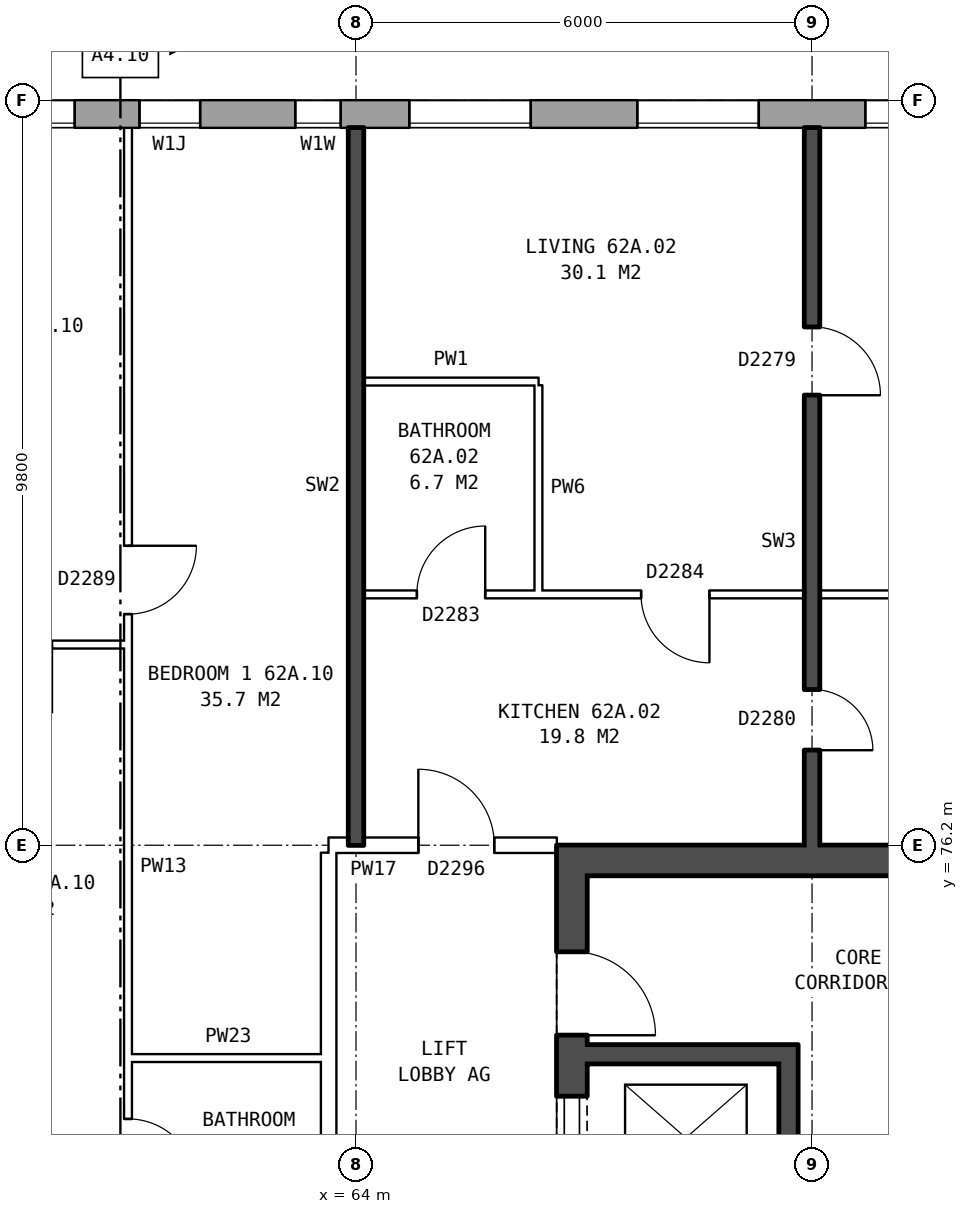
"""IFC4 building model, lengths in metres.
Left out: names, types, materials, properties, quantities, classifications, styles, units other than length and angle.
Written with IfcOpenShell. Run it as: python <this file> out.ifc"""

import sys

from ifc_helpers import new_model, si_unit, direction, frame, frame_2d, origin, place, context, subcontext, project, spatial, rectangle, extrude, element, fill, save


model = new_model("IFC4")
c1 = context("Model", 3, precision=1e-05, world=origin(), true_north=direction((0.0, 1.0)))
c2 = subcontext(c1, "Body", "Model", "MODEL_VIEW")
j1 = project(units=[si_unit("LENGTHUNIT", "METRE"), si_unit("PLANEANGLEUNIT", "RADIAN")], contexts=[c1])
p1 = place(None, origin())
s1 = spatial("IfcSite", under=j1, at=p1, CompositionType="ELEMENT")
p2 = place(p1, origin())
s2 = spatial("IfcBuilding", under=s1, at=p2, CompositionType="ELEMENT")
p3 = place(p2, frame((0.0, 0.0, 221.4)))
s3 = spatial("IfcBuildingStorey", under=s2, at=p3, CompositionType="ELEMENT", Elevation=221.4)
p4 = place(p3, frame((74.95, 85.82, 0.0), z_axis=(0.0, 0.0, 1.0), x_axis=(-1.0, 0.0, 0.0)))
e1 = element("IfcWall", 1, at=p4, inside=s3, PredefinedType="STANDARD", context=c2, shape_type="SweptSolid", body=[
    extrude(rectangle(XDim=39.875, YDim=0.36, at=frame_2d((19.938, 0.0))), origin(), (0.0, 0.0, 1.0), 2.85),
])
p5 = place(p4, frame((2.65, 0.0, 0.8)))
e2 = element("IfcOpeningElement", 2, at=p5, cuts=e1, PredefinedType="OPENING", context=c2, shape_type="SweptSolid", body=[
    extrude(rectangle(XDim=1.6, YDim=1.8, at=frame_2d((0.8, 0.9))), frame((0.0, 0.19, 0.0), z_axis=(0.0, -1.0, 0.0), x_axis=(1.0, 0.0, 0.0)), (0.0, 0.0, 1.0), 0.38),
])
p6 = place(p4, frame((5.65, 0.0, 0.8)))
e3 = element("IfcOpeningElement", 3, at=p6, cuts=e1, PredefinedType="OPENING", context=c2, shape_type="SweptSolid", body=[
    extrude(rectangle(XDim=1.6, YDim=1.8, at=frame_2d((0.8, 0.9))), frame((0.0, 0.19, 0.0), z_axis=(0.0, -1.0, 0.0), x_axis=(1.0, 0.0, 0.0)), (0.0, 0.0, 1.0), 0.38),
])
p7 = place(p4, frame((8.65, 0.0, 0.8)))
e4 = element("IfcOpeningElement", 4, at=p7, cuts=e1, PredefinedType="OPENING", context=c2, shape_type="SweptSolid", body=[
    extrude(rectangle(XDim=1.6, YDim=1.8, at=frame_2d((0.8, 0.9))), frame((0.0, 0.19, 0.0), z_axis=(0.0, -1.0, 0.0), x_axis=(1.0, 0.0, 0.0)), (0.0, 0.0, 1.0), 0.38),
])
p8 = place(p4, frame((11.15, 0.0, 1.55)))
e5 = element("IfcOpeningElement", 5, at=p8, cuts=e1, PredefinedType="OPENING", context=c2, shape_type="SweptSolid", body=[
    extrude(rectangle(XDim=0.6, YDim=0.9, at=frame_2d((0.3, 0.45))), frame((0.0, 0.19, 0.0), z_axis=(0.0, -1.0, 0.0), x_axis=(1.0, 0.0, 0.0)), (0.0, 0.0, 1.0), 0.38),
])
p9 = place(p4, frame((14.65, 0.0, 0.8)))
e6 = element("IfcOpeningElement", 6, at=p9, cuts=e1, PredefinedType="OPENING", context=c2, shape_type="SweptSolid", body=[
    extrude(rectangle(XDim=1.6, YDim=1.8, at=frame_2d((0.8, 0.9))), frame((0.0, 0.19, 0.0), z_axis=(0.0, -1.0, 0.0), x_axis=(1.0, 0.0, 0.0)), (0.0, 0.0, 1.0), 0.38),
])
p10 = place(p4, frame((17.65, 0.0, 0.8)))
e7 = element("IfcOpeningElement", 7, at=p10, cuts=e1, PredefinedType="OPENING", context=c2, shape_type="SweptSolid", body=[
    extrude(rectangle(XDim=1.6, YDim=1.8, at=frame_2d((0.8, 0.9))), frame((0.0, 0.19, 0.0), z_axis=(0.0, -1.0, 0.0), x_axis=(1.0, 0.0, 0.0)), (0.0, 0.0, 1.0), 0.38),
])
p11 = place(p4, frame((20.65, 0.0, 0.8)))
e8 = element("IfcOpeningElement", 8, at=p11, cuts=e1, PredefinedType="OPENING", context=c2, shape_type="SweptSolid", body=[
    extrude(rectangle(XDim=1.6, YDim=1.8, at=frame_2d((0.8, 0.9))), frame((0.0, 0.19, 0.0), z_axis=(0.0, -1.0, 0.0), x_axis=(1.0, 0.0, 0.0)), (0.0, 0.0, 1.0), 0.38),
])
p12 = place(p4, frame((23.65, 0.0, 0.8)))
e9 = element("IfcOpeningElement", 9, at=p12, cuts=e1, PredefinedType="OPENING", context=c2, shape_type="SweptSolid", body=[
    extrude(rectangle(XDim=1.6, YDim=1.8, at=frame_2d((0.8, 0.9))), frame((0.0, 0.19, 0.0), z_axis=(0.0, -1.0, 0.0), x_axis=(1.0, 0.0, 0.0)), (0.0, 0.0, 1.0), 0.38),
])
p13 = place(p4, frame((26.65, 0.0, 0.8)))
e10 = element("IfcOpeningElement", 10, at=p13, cuts=e1, PredefinedType="OPENING", context=c2, shape_type="SweptSolid", body=[
    extrude(rectangle(XDim=1.6, YDim=1.8, at=frame_2d((0.8, 0.9))), frame((0.0, 0.19, 0.0), z_axis=(0.0, -1.0, 0.0), x_axis=(1.0, 0.0, 0.0)), (0.0, 0.0, 1.0), 0.38),
])
p14 = place(p4, frame((30.05, 0.0, 1.7)))
e11 = element("IfcOpeningElement", 11, at=p14, cuts=e1, PredefinedType="OPENING", context=c2, shape_type="SweptSolid", body=[
    extrude(rectangle(XDim=0.6, YDim=0.9, at=frame_2d((0.3, 0.45))), frame((0.0, 0.19, 0.0), z_axis=(0.0, -1.0, 0.0), x_axis=(1.0, 0.0, 0.0)), (0.0, 0.0, 1.0), 0.38),
])
p15 = place(p4, frame((32.65, 0.0, 0.8)))
e12 = element("IfcOpeningElement", 12, at=p15, cuts=e1, PredefinedType="OPENING", context=c2, shape_type="SweptSolid", body=[
    extrude(rectangle(XDim=1.6, YDim=1.8, at=frame_2d((0.8, 0.9))), frame((0.0, 0.19, 0.0), z_axis=(0.0, -1.0, 0.0), x_axis=(1.0, 0.0, 0.0)), (0.0, 0.0, 1.0), 0.38),
])
p16 = place(p4, frame((35.65, 0.0, 0.8)))
e13 = element("IfcOpeningElement", 13, at=p16, cuts=e1, PredefinedType="OPENING", context=c2, shape_type="SweptSolid", body=[
    extrude(rectangle(XDim=1.6, YDim=1.8, at=frame_2d((0.8, 0.9))), frame((0.0, 0.19, 0.0), z_axis=(0.0, -1.0, 0.0), x_axis=(1.0, 0.0, 0.0)), (0.0, 0.0, 1.0), 0.38),
])
p17 = place(p4, frame((13.0, 0.0, 0.15)))
e14 = element("IfcOpeningElement", 14, at=p17, cuts=e1, PredefinedType="OPENING", context=c2, shape_type="SweptSolid", body=[
    extrude(rectangle(XDim=0.8, YDim=1.5, at=frame_2d((0.4, 0.75))), frame((0.0, 0.19, 0.0), z_axis=(0.0, -1.0, 0.0), x_axis=(1.0, 0.0, 0.0)), (0.0, 0.0, 1.0), 0.38),
])
p18 = place(p4, frame((30.95, 0.0, 0.8)))
e15 = element("IfcOpeningElement", 15, at=p18, cuts=e1, PredefinedType="OPENING", context=c2, shape_type="SweptSolid", body=[
    extrude(rectangle(XDim=1.4, YDim=1.8, at=frame_2d((0.7, 0.9))), frame((0.0, 0.19, 0.0), z_axis=(0.0, -1.0, 0.0), x_axis=(1.0, 0.0, 0.0)), (0.0, 0.0, 1.0), 0.38),
])
p19 = place(p3, frame((66.84, 63.8, 0.0), z_axis=(0.0, 0.0, 1.0), x_axis=(0.0, 1.0, 0.0)))
e16 = element("IfcWall", 16, at=p19, inside=s3, PredefinedType="SHEAR", context=c2, shape_type="SweptSolid", body=[
    extrude(rectangle(XDim=12.4, YDim=0.4, at=frame_2d((6.2, 0.0))), origin(), (0.0, 0.0, 1.0), 2.85),
])
p20 = place(p19, frame((1.325, 0.0, 0.0)))
e17 = element("IfcOpeningElement", 17, at=p20, cuts=e16, PredefinedType="OPENING", context=c2, shape_type="SweptSolid", body=[
    extrude(rectangle(XDim=1.1, YDim=2.1, at=frame_2d((0.55, 1.05))), frame((0.0, 0.21, 0.0), z_axis=(0.0, -1.0, 0.0), x_axis=(1.0, 0.0, 0.0)), (0.0, 0.0, 1.0), 0.42),
])
p21 = place(p19, frame((3.6, 0.0, 0.0)))
e18 = element("IfcOpeningElement", 18, at=p21, cuts=e16, PredefinedType="OPENING", context=c2, shape_type="SweptSolid", body=[
    extrude(rectangle(XDim=1.1, YDim=2.1, at=frame_2d((0.55, 1.05))), frame((0.0, 0.21, 0.0), z_axis=(0.0, -1.0, 0.0), x_axis=(1.0, 0.0, 0.0)), (0.0, 0.0, 1.0), 0.42),
])
p22 = place(p19, frame((5.8, 0.0, 0.0)))
e19 = element("IfcOpeningElement", 19, at=p22, cuts=e16, PredefinedType="OPENING", context=c2, shape_type="SweptSolid", body=[
    extrude(rectangle(XDim=1.1, YDim=2.1, at=frame_2d((0.55, 1.05))), frame((0.0, 0.21, 0.0), z_axis=(0.0, -1.0, 0.0), x_axis=(1.0, 0.0, 0.0)), (0.0, 0.0, 1.0), 0.42),
])
p23 = place(p19, frame((8.0, 0.0, 0.0)))
e20 = element("IfcOpeningElement", 20, at=p23, cuts=e16, PredefinedType="OPENING", context=c2, shape_type="SweptSolid", body=[
    extrude(rectangle(XDim=1.1, YDim=2.1, at=frame_2d((0.55, 1.05))), frame((0.0, 0.21, 0.0), z_axis=(0.0, -1.0, 0.0), x_axis=(1.0, 0.0, 0.0)), (0.0, 0.0, 1.0), 0.42),
])
p24 = place(p19, frame((9.9, 0.0, 0.0)))
e21 = element("IfcOpeningElement", 21, at=p24, cuts=e16, PredefinedType="OPENING", context=c2, shape_type="SweptSolid", body=[
    extrude(rectangle(XDim=1.1, YDim=2.1, at=frame_2d((0.55, 1.05))), frame((0.0, 0.21, 0.0), z_axis=(0.0, -1.0, 0.0), x_axis=(1.0, 0.0, 0.0)), (0.0, 0.0, 1.0), 0.42),
])
p25 = place(p3, frame((67.04, 76.0, 0.0), z_axis=(0.0, 0.0, 1.0), x_axis=(1.0, 0.0, 0.0)))
e22 = element("IfcWall", 22, at=p25, inside=s3, PredefinedType="SHEAR", context=c2, shape_type="SweptSolid", body=[
    extrude(rectangle(XDim=8.2, YDim=0.4, at=frame_2d((4.1, 0.0))), origin(), (0.0, 0.0, 1.0), 2.85),
])
p26 = place(p3, frame((67.04, 73.45, 0.0), z_axis=(0.0, 0.0, 1.0), x_axis=(1.0, 0.0, 0.0)))
e23 = element("IfcWall", 23, at=p26, inside=s3, PredefinedType="SHEAR", context=c2, shape_type="SweptSolid", body=[
    extrude(rectangle(XDim=2.525, YDim=0.25, at=frame_2d((1.262, 0.0))), origin(), (0.0, 0.0, 1.0), 2.85),
])
p27 = place(p3, frame((69.69, 66.975, 0.0), z_axis=(0.0, 0.0, 1.0), x_axis=(0.0, 1.0, 0.0)))
e24 = element("IfcWall", 24, at=p27, inside=s3, PredefinedType="SHEAR", context=c2, shape_type="SweptSolid", body=[
    extrude(rectangle(XDim=6.6, YDim=0.25, at=frame_2d((3.3, 0.0))), origin(), (0.0, 0.0, 1.0), 2.85),
])
p28 = place(p3, frame((63.64, 63.9, 0.0), z_axis=(0.0, 0.0, 1.0), x_axis=(0.0, 1.0, 0.0)))
e25 = element("IfcWall", 25, at=p28, inside=s3, PredefinedType="PARTITIONING", context=c2, shape_type="SweptSolid", body=[
    extrude(rectangle(XDim=12.2, YDim=0.2, at=frame_2d((6.1, 0.0))), origin(), (0.0, 0.0, 1.0), 2.85),
])
p29 = place(p28, frame((5.1, 0.0, 0.0)))
e26 = element("IfcOpeningElement", 26, at=p29, cuts=e25, PredefinedType="OPENING", context=c2, shape_type="SweptSolid", body=[
    extrude(rectangle(XDim=2.0, YDim=2.1, at=frame_2d((1.0, 1.05))), frame((0.0, 0.11, 0.0), z_axis=(0.0, -1.0, 0.0), x_axis=(1.0, 0.0, 0.0)), (0.0, 0.0, 1.0), 0.22),
])
p30 = place(p3, frame((61.0, 73.4, 0.0), z_axis=(0.0, 0.0, 1.0), x_axis=(1.0, 0.0, 0.0)))
e27 = element("IfcWall", 27, at=p30, inside=s3, PredefinedType="PARTITIONING", context=c2, shape_type="SweptSolid", body=[
    extrude(rectangle(XDim=2.64, YDim=0.1, at=frame_2d((1.32, 0.0))), origin(), (0.0, 0.0, 1.0), 2.85),
])
p31 = place(p3, frame((63.64, 76.2, 0.0), z_axis=(0.0, 0.0, 1.0), x_axis=(1.0, 0.0, 0.0)))
e28 = element("IfcWall", 28, at=p31, inside=s3, PredefinedType="PARTITIONING", context=c2, shape_type="SweptSolid", body=[
    extrude(rectangle(XDim=3.0, YDim=0.2, at=frame_2d((1.5, 0.0))), origin(), (0.0, 0.0, 1.0), 2.85),
])
p32 = place(p31, frame((1.18, 0.0, 0.0)))
e29 = element("IfcOpeningElement", 29, at=p32, cuts=e28, PredefinedType="OPENING", context=c2, shape_type="SweptSolid", body=[
    extrude(rectangle(XDim=1.0, YDim=2.1, at=frame_2d((0.5, 1.05))), frame((0.0, 0.11, 0.0), z_axis=(0.0, -1.0, 0.0), x_axis=(1.0, 0.0, 0.0)), (0.0, 0.0, 1.0), 0.22),
])
p33 = place(p3, frame((58.1, 78.84, 0.0), z_axis=(0.0, 0.0, 1.0), x_axis=(1.0, 0.0, 0.0)))
e30 = element("IfcWall", 30, at=p33, inside=s3, PredefinedType="PARTITIONING", context=c2, shape_type="SweptSolid", body=[
    extrude(rectangle(XDim=2.9, YDim=0.1, at=frame_2d((1.45, 0.0))), origin(), (0.0, 0.0, 1.0), 2.85),
])
p34 = place(p33, frame((1.0, 0.0, 0.0)))
e31 = element("IfcOpeningElement", 31, at=p34, cuts=e30, PredefinedType="OPENING", context=c2, shape_type="SweptSolid", body=[
    extrude(rectangle(XDim=0.9, YDim=2.1, at=frame_2d((0.45, 1.05))), frame((0.0, 0.06, 0.0), z_axis=(0.0, -1.0, 0.0), x_axis=(1.0, 0.0, 0.0)), (0.0, 0.0, 1.0), 0.12),
])
p35 = place(p3, frame((64.1, 79.5, 0.0), z_axis=(0.0, 0.0, 1.0), x_axis=(1.0, 0.0, 0.0)))
e32 = element("IfcWall", 32, at=p35, inside=s3, PredefinedType="PARTITIONING", context=c2, shape_type="SweptSolid", body=[
    extrude(rectangle(XDim=11.8, YDim=0.1, at=frame_2d((5.9, 0.0))), origin(), (0.0, 0.0, 1.0), 2.85),
])
p36 = place(p35, frame((3.65, 0.0, 0.0)))
e33 = element("IfcOpeningElement", 33, at=p36, cuts=e32, PredefinedType="OPENING", context=c2, shape_type="SweptSolid", body=[
    extrude(rectangle(XDim=0.9, YDim=2.1, at=frame_2d((0.45, 1.05))), frame((0.0, 0.06, 0.0), z_axis=(0.0, -1.0, 0.0), x_axis=(1.0, 0.0, 0.0)), (0.0, 0.0, 1.0), 0.12),
])
p37 = place(p35, frame((0.7, 0.0, 0.0)))
e34 = element("IfcOpeningElement", 34, at=p37, cuts=e32, PredefinedType="OPENING", context=c2, shape_type="SweptSolid", body=[
    extrude(rectangle(XDim=0.9, YDim=2.1, at=frame_2d((0.45, 1.05))), frame((0.0, 0.06, 0.0), z_axis=(0.0, -1.0, 0.0), x_axis=(1.0, 0.0, 0.0)), (0.0, 0.0, 1.0), 0.12),
])
p38 = place(p3, frame((64.1, 82.3, 0.0), z_axis=(0.0, 0.0, 1.0), x_axis=(1.0, 0.0, 0.0)))
e35 = element("IfcWall", 35, at=p38, inside=s3, PredefinedType="PARTITIONING", context=c2, shape_type="SweptSolid", body=[
    extrude(rectangle(XDim=2.3, YDim=0.1, at=frame_2d((1.15, 0.0))), origin(), (0.0, 0.0, 1.0), 2.85),
])
p39 = place(p3, frame((61.0, 71.3, 0.0), z_axis=(0.0, 0.0, 1.0), x_axis=(0.0, 1.0, 0.0)))
e36 = element("IfcWall", 36, at=p39, inside=s3, PredefinedType="PARTITIONING", context=c2, shape_type="SweptSolid", body=[
    extrude(rectangle(XDim=14.34, YDim=0.1, at=frame_2d((7.17, 0.0))), origin(), (0.0, 0.0, 1.0), 2.85),
])
p40 = place(p39, frame((7.94, 0.0, 0.0)))
e37 = element("IfcOpeningElement", 37, at=p40, cuts=e36, PredefinedType="OPENING", context=c2, shape_type="SweptSolid", body=[
    extrude(rectangle(XDim=0.9, YDim=2.1, at=frame_2d((0.45, 1.05))), frame((0.0, 0.06, 0.0), z_axis=(0.0, -1.0, 0.0), x_axis=(1.0, 0.0, 0.0)), (0.0, 0.0, 1.0), 0.12),
])
p41 = place(p39, frame((0.4, 0.0, 0.0)))
e38 = element("IfcOpeningElement", 38, at=p41, cuts=e36, PredefinedType="OPENING", context=c2, shape_type="SweptSolid", body=[
    extrude(rectangle(XDim=0.9, YDim=2.1, at=frame_2d((0.45, 1.05))), frame((0.0, 0.06, 0.0), z_axis=(0.0, -1.0, 0.0), x_axis=(1.0, 0.0, 0.0)), (0.0, 0.0, 1.0), 0.12),
])
p42 = place(p3, frame((64.0, 76.2, 0.0), z_axis=(0.0, 0.0, 1.0), x_axis=(0.0, 1.0, 0.0)))
e39 = element("IfcWall", 39, at=p42, inside=s3, PredefinedType="SOLIDWALL", context=c2, shape_type="SweptSolid", body=[
    extrude(rectangle(XDim=9.44, YDim=0.2, at=frame_2d((4.72, 0.0))), origin(), (0.0, 0.0, 1.0), 2.85),
])
p43 = place(p3, frame((66.4, 79.55, 0.0), z_axis=(0.0, 0.0, 1.0), x_axis=(0.0, 1.0, 0.0)))
e40 = element("IfcWall", 40, at=p43, inside=s3, PredefinedType="PARTITIONING", context=c2, shape_type="SweptSolid", body=[
    extrude(rectangle(XDim=2.7, YDim=0.1, at=frame_2d((1.35, 0.0))), origin(), (0.0, 0.0, 1.0), 2.85),
])
p44 = place(p3, frame((70.0, 76.2, 0.0), z_axis=(0.0, 0.0, 1.0), x_axis=(0.0, 1.0, 0.0)))
e41 = element("IfcWall", 41, at=p44, inside=s3, PredefinedType="SOLIDWALL", context=c2, shape_type="SweptSolid", body=[
    extrude(rectangle(XDim=9.44, YDim=0.2, at=frame_2d((4.72, 0.0))), origin(), (0.0, 0.0, 1.0), 2.85),
])
p45 = place(p44, frame((5.92, 0.0, 0.0)))
e42 = element("IfcOpeningElement", 42, at=p45, cuts=e41, PredefinedType="OPENING", context=c2, shape_type="SweptSolid", body=[
    extrude(rectangle(XDim=0.9, YDim=2.1, at=frame_2d((0.45, 1.05))), frame((0.0, 0.11, 0.0), z_axis=(0.0, -1.0, 0.0), x_axis=(1.0, 0.0, 0.0)), (0.0, 0.0, 1.0), 0.22),
])
p46 = place(p44, frame((1.25, 0.0, 0.0)))
e43 = element("IfcOpeningElement", 43, at=p46, cuts=e41, PredefinedType="OPENING", context=c2, shape_type="SweptSolid", body=[
    extrude(rectangle(XDim=0.8, YDim=2.1, at=frame_2d((0.4, 1.05))), frame((0.0, 0.11, 0.0), z_axis=(0.0, -1.0, 0.0), x_axis=(1.0, 0.0, 0.0)), (0.0, 0.0, 1.0), 0.22),
])
p47 = place(p5, origin())
e44 = element("IfcWindow", 44, at=p47, inside=s3, PartitioningType="SINGLE_PANEL", PredefinedType="WINDOW", context=c2, shape_type="SweptSolid", body=[
    extrude(rectangle(XDim=1.6, YDim=1.8, at=frame_2d((0.8, 0.9))), frame((0.0, 0.15, 0.0), z_axis=(0.0, -1.0, 0.0), x_axis=(1.0, 0.0, 0.0)), (0.0, 0.0, 1.0), 0.06),
])
fill(e2, e44)
p48 = place(p6, origin())
e45 = element("IfcWindow", 45, at=p48, inside=s3, PartitioningType="SINGLE_PANEL", PredefinedType="WINDOW", context=c2, shape_type="SweptSolid", body=[
    extrude(rectangle(XDim=1.6, YDim=1.8, at=frame_2d((0.8, 0.9))), frame((0.0, 0.15, 0.0), z_axis=(0.0, -1.0, 0.0), x_axis=(1.0, 0.0, 0.0)), (0.0, 0.0, 1.0), 0.06),
])
fill(e3, e45)
p49 = place(p7, origin())
e46 = element("IfcWindow", 46, at=p49, inside=s3, PartitioningType="SINGLE_PANEL", PredefinedType="WINDOW", context=c2, shape_type="SweptSolid", body=[
    extrude(rectangle(XDim=1.6, YDim=1.8, at=frame_2d((0.8, 0.9))), frame((0.0, 0.15, 0.0), z_axis=(0.0, -1.0, 0.0), x_axis=(1.0, 0.0, 0.0)), (0.0, 0.0, 1.0), 0.06),
])
fill(e4, e46)
p50 = place(p8, origin())
e47 = element("IfcWindow", 47, at=p50, inside=s3, PartitioningType="SINGLE_PANEL", PredefinedType="WINDOW", context=c2, shape_type="SweptSolid", body=[
    extrude(rectangle(XDim=0.6, YDim=0.9, at=frame_2d((0.3, 0.45))), frame((0.0, 0.15, 0.0), z_axis=(0.0, -1.0, 0.0), x_axis=(1.0, 0.0, 0.0)), (0.0, 0.0, 1.0), 0.06),
])
fill(e5, e47)
p51 = place(p9, origin())
e48 = element("IfcWindow", 48, at=p51, inside=s3, PartitioningType="SINGLE_PANEL", PredefinedType="WINDOW", context=c2, shape_type="SweptSolid", body=[
    extrude(rectangle(XDim=1.6, YDim=1.8, at=frame_2d((0.8, 0.9))), frame((0.0, 0.15, 0.0), z_axis=(0.0, -1.0, 0.0), x_axis=(1.0, 0.0, 0.0)), (0.0, 0.0, 1.0), 0.06),
])
fill(e6, e48)
p52 = place(p23, origin())
e49 = element("IfcDoor", 49, at=p52, inside=s3, OperationType="DOUBLE_DOOR_SLIDING", PredefinedType="DOOR", context=c2, shape_type="SweptSolid", body=[
    extrude(rectangle(XDim=1.1, YDim=2.1, at=frame_2d((0.55, 1.05))), frame((0.0, -0.135, 0.0), z_axis=(0.0, -1.0, 0.0), x_axis=(1.0, 0.0, 0.0)), (0.0, 0.0, 1.0), 0.05),
])
fill(e20, e49)
p53 = place(p24, frame((1.1, 0.0, 0.0), z_axis=(0.0, 0.0, 1.0), x_axis=(-1.0, 0.0, 0.0)))
e50 = element("IfcDoor", 50, at=p53, inside=s3, OperationType="SINGLE_SWING_RIGHT", PredefinedType="DOOR", context=c2, shape_type="SweptSolid", body=[
    extrude(rectangle(XDim=1.1, YDim=2.1, at=frame_2d((0.55, 1.05))), frame((0.0, 0.185, 0.0), z_axis=(0.0, -1.0, 0.0), x_axis=(1.0, 0.0, 0.0)), (0.0, 0.0, 1.0), 0.05),
])
fill(e21, e50)
p54 = place(p45, frame((0.9, 0.0, 0.0), z_axis=(0.0, 0.0, 1.0), x_axis=(-1.0, 0.0, 0.0)))
e51 = element("IfcDoor", 51, at=p54, inside=s3, OperationType="SINGLE_SWING_RIGHT", PredefinedType="DOOR", context=c2, shape_type="SweptSolid", body=[
    extrude(rectangle(XDim=0.9, YDim=2.1, at=frame_2d((0.45, 1.05))), frame((0.0, 0.025, 0.0), z_axis=(0.0, -1.0, 0.0), x_axis=(1.0, 0.0, 0.0)), (0.0, 0.0, 1.0), 0.05),
])
fill(e42, e51)
p55 = place(p32, origin())
e52 = element("IfcDoor", 52, at=p55, inside=s3, OperationType="SINGLE_SWING_LEFT", PredefinedType="DOOR", context=c2, shape_type="SweptSolid", body=[
    extrude(rectangle(XDim=1.0, YDim=2.1, at=frame_2d((0.5, 1.05))), frame((0.0, 0.025, 0.0), z_axis=(0.0, -1.0, 0.0), x_axis=(1.0, 0.0, 0.0)), (0.0, 0.0, 1.0), 0.05),
])
fill(e29, e52)
p56 = place(p36, frame((0.9, 0.0, 0.0), z_axis=(0.0, 0.0, 1.0), x_axis=(-1.0, 0.0, 0.0)))
e53 = element("IfcDoor", 53, at=p56, inside=s3, OperationType="SINGLE_SWING_LEFT", PredefinedType="DOOR", context=c2, shape_type="SweptSolid", body=[
    extrude(rectangle(XDim=0.9, YDim=2.1, at=frame_2d((0.45, 1.05))), frame((0.0, 0.025, 0.0), z_axis=(0.0, -1.0, 0.0), x_axis=(1.0, 0.0, 0.0)), (0.0, 0.0, 1.0), 0.05),
])
fill(e33, e53)
p57 = place(p46, frame((0.8, 0.0, 0.0), z_axis=(0.0, 0.0, 1.0), x_axis=(-1.0, 0.0, 0.0)))
e54 = element("IfcDoor", 54, at=p57, inside=s3, OperationType="SINGLE_SWING_RIGHT", PredefinedType="DOOR", context=c2, shape_type="SweptSolid", body=[
    extrude(rectangle(XDim=0.8, YDim=2.1, at=frame_2d((0.4, 1.05))), frame((0.0, 0.025, 0.0), z_axis=(0.0, -1.0, 0.0), x_axis=(1.0, 0.0, 0.0)), (0.0, 0.0, 1.0), 0.05),
])
fill(e43, e54)
p58 = place(p37, origin())
e55 = element("IfcDoor", 55, at=p58, inside=s3, OperationType="SINGLE_SWING_RIGHT", PredefinedType="DOOR", context=c2, shape_type="SweptSolid", body=[
    extrude(rectangle(XDim=0.9, YDim=2.1, at=frame_2d((0.45, 1.05))), frame((0.0, 0.025, 0.0), z_axis=(0.0, -1.0, 0.0), x_axis=(1.0, 0.0, 0.0)), (0.0, 0.0, 1.0), 0.05),
])
fill(e34, e55)
p59 = place(p40, frame((0.9, 0.0, 0.0), z_axis=(0.0, 0.0, 1.0), x_axis=(-1.0, 0.0, 0.0)))
e56 = element("IfcDoor", 56, at=p59, inside=s3, OperationType="SINGLE_SWING_LEFT", PredefinedType="DOOR", context=c2, shape_type="SweptSolid", body=[
    extrude(rectangle(XDim=0.9, YDim=2.1, at=frame_2d((0.45, 1.05))), frame((0.0, 0.025, 0.0), z_axis=(0.0, -1.0, 0.0), x_axis=(1.0, 0.0, 0.0)), (0.0, 0.0, 1.0), 0.05),
])
fill(e37, e56)
p60 = place(p41, frame((0.9, 0.0, 0.0), z_axis=(0.0, 0.0, 1.0), x_axis=(-1.0, 0.0, 0.0)))
e57 = element("IfcDoor", 57, at=p60, inside=s3, OperationType="SINGLE_SWING_RIGHT", PredefinedType="DOOR", context=c2, shape_type="SweptSolid", body=[
    extrude(rectangle(XDim=0.9, YDim=2.1, at=frame_2d((0.45, 1.05))), frame((0.0, 0.025, 0.0), z_axis=(0.0, -1.0, 0.0), x_axis=(1.0, 0.0, 0.0)), (0.0, 0.0, 1.0), 0.05),
])
fill(e38, e57)
p61 = place(p17, origin())
e58 = element("IfcWindow", 58, at=p61, inside=s3, PartitioningType="SINGLE_PANEL", PredefinedType="WINDOW", context=c2, shape_type="SweptSolid", body=[
    extrude(rectangle(XDim=0.8, YDim=1.5, at=frame_2d((0.4, 0.75))), frame((0.0, 0.15, 0.0), z_axis=(0.0, -1.0, 0.0), x_axis=(1.0, 0.0, 0.0)), (0.0, 0.0, 1.0), 0.06),
])
fill(e14, e58)
save(model, sys.argv[1])
